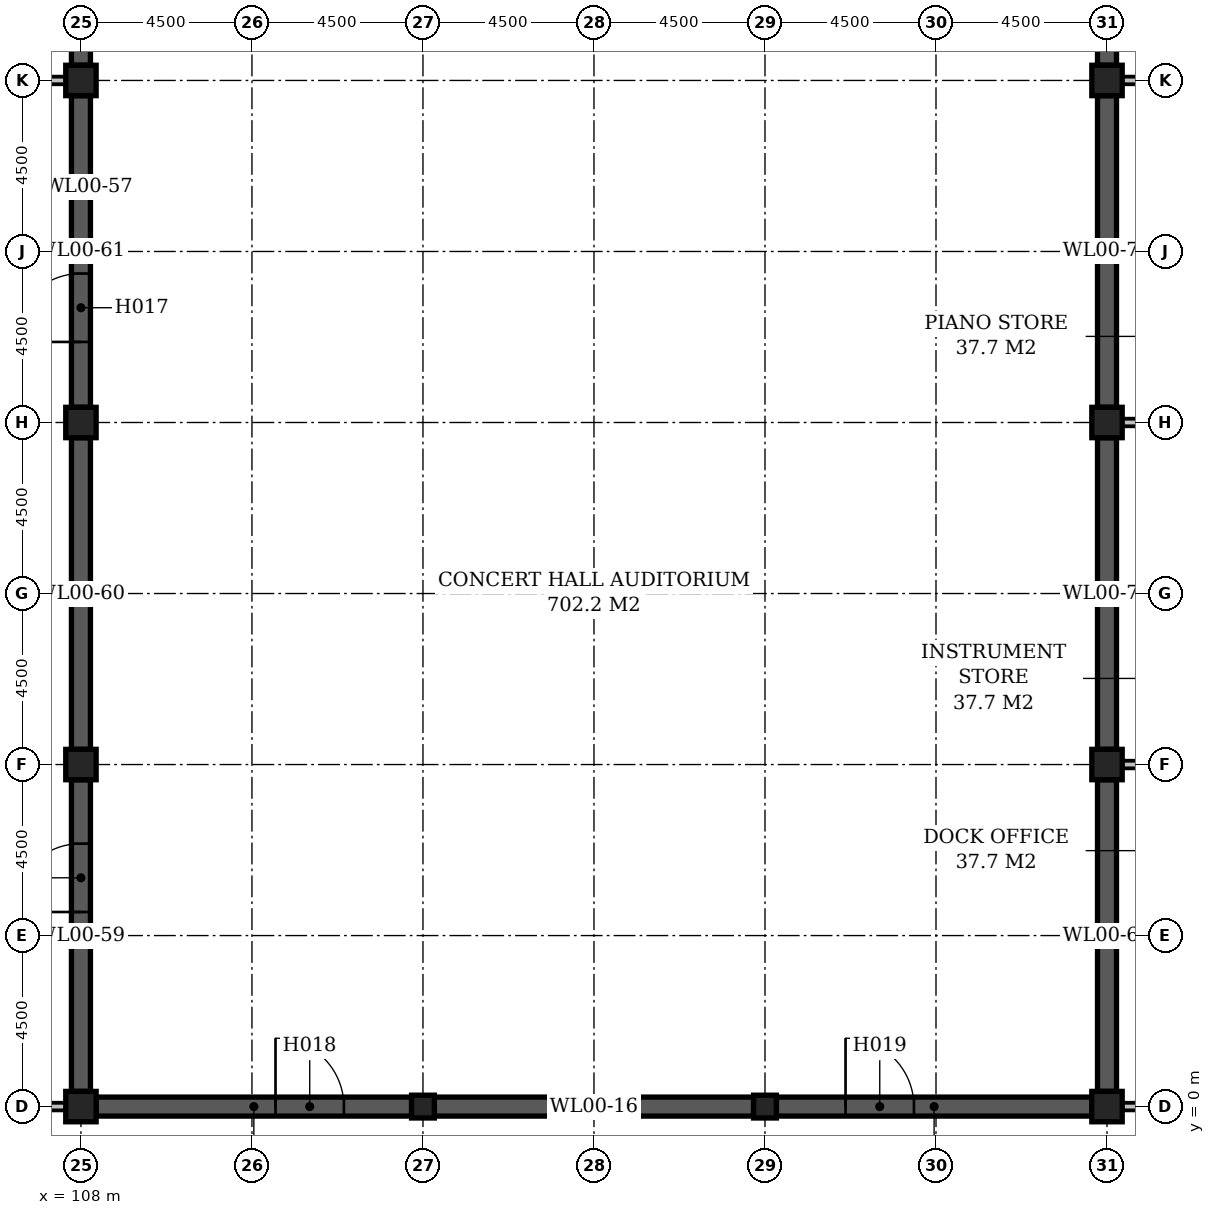
"""IFC4 building model, lengths in metres.
Left out: names, types, materials, properties, quantities, classifications, styles, units other than length and angle.
Written with IfcOpenShell. Run it as: python <this file> out.ifc"""

import sys

from ifc_helpers import new_model, si_unit, direction, frame, frame_2d, origin, origin_2d, place, context, subcontext, project, spatial, rectangle, extrude, element, fill, save


model = new_model("IFC4")
c1 = context("Model", 3, precision=1e-05, world=origin(), true_north=direction((0.0, 1.0)))
c2 = subcontext(c1, "Body", "Model", "MODEL_VIEW")
j1 = project(units=[si_unit("LENGTHUNIT", "METRE"), si_unit("PLANEANGLEUNIT", "RADIAN")], contexts=[c1])
p1 = place(None, origin())
s1 = spatial("IfcSite", under=j1, at=p1, CompositionType="ELEMENT")
p2 = place(p1, origin())
s2 = spatial("IfcBuilding", under=s1, at=p2, CompositionType="ELEMENT")
p3 = place(p2, origin())
s3 = spatial("IfcBuildingStorey", under=s2, at=p3, CompositionType="ELEMENT", Elevation=0.0)
for number, where, z_axis, x_axis in (
    (1, (108.0, 0.0, -0.3), (0.0, 0.0, 1.0), (1.0, 0.0, 0.0)),
    (2, (108.0, 9.0, -0.3), (0.0, 0.0, 1.0), (1.0, 0.0, 0.0)),
    (3, (108.0, 18.0, -0.3), (0.0, 0.0, 1.0), (1.0, 0.0, 0.0)),
    (4, (108.0, 27.0, -0.3), (0.0, 0.0, 1.0), (1.0, 0.0, 0.0)),
):
    element("IfcColumn", number, at=place(p3, frame(where, z_axis=z_axis, x_axis=x_axis)), inside=s3, PredefinedType="COLUMN", context=c2, shape_type="SweptSolid", body=[
        extrude(rectangle(XDim=0.8, YDim=0.8, at=origin_2d()), origin(), (0.0, 0.0, 1.0), 9.0),
    ])
for number, where, z_axis, x_axis in (
    (5, (117.0, 0.0, -0.3), (0.0, 0.0, 1.0), (1.0, 0.0, 0.0)),
    (6, (126.0, 0.0, -0.3), (0.0, 0.0, 1.0), (1.0, 0.0, 0.0)),
):
    element("IfcColumn", number, at=place(p3, frame(where, z_axis=z_axis, x_axis=x_axis)), inside=s3, PredefinedType="COLUMN", context=c2, shape_type="SweptSolid", body=[
        extrude(rectangle(XDim=0.6, YDim=0.6, at=origin_2d()), origin(), (0.0, 0.0, 1.0), 9.0),
    ])
for number, where, z_axis, x_axis in (
    (7, (135.0, 0.0, -0.3), (0.0, 0.0, 1.0), (1.0, 0.0, 0.0)),
    (8, (135.0, 9.0, -0.3), (0.0, 0.0, 1.0), (1.0, 0.0, 0.0)),
    (9, (135.0, 18.0, -0.3), (0.0, 0.0, 1.0), (1.0, 0.0, 0.0)),
    (10, (135.0, 27.0, -0.3), (0.0, 0.0, 1.0), (1.0, 0.0, 0.0)),
):
    element("IfcColumn", number, at=place(p3, frame(where, z_axis=z_axis, x_axis=x_axis)), inside=s3, PredefinedType="COLUMN", context=c2, shape_type="SweptSolid", body=[
        extrude(rectangle(XDim=0.8, YDim=0.8, at=origin_2d()), origin(), (0.0, 0.0, 1.0), 9.0),
    ])
p4 = place(p3, frame((99.3, 0.0, 0.0), z_axis=(0.0, 0.0, 1.0), x_axis=(1.0, 0.0, 0.0)))
e11 = element("IfcWall", 11, at=p4, inside=s3, PredefinedType="STANDARD", context=c2, shape_type="SweptSolid", body=[
    extrude(rectangle(XDim=8.3, YDim=0.2, at=frame_2d((4.15, 0.0))), origin(), (0.0, 0.0, 1.0), 8.7),
])
p5 = place(p4, frame((1.52, 0.0, 0.0)))
e12 = element("IfcOpeningElement", 12, at=p5, cuts=e11, PredefinedType="OPENING", context=c2, shape_type="SweptSolid", body=[
    extrude(rectangle(XDim=2.4, YDim=2.7, at=frame_2d((1.2, 1.35))), frame((0.0, 0.112, 0.0), z_axis=(0.0, -1.0, 0.0), x_axis=(1.0, 0.0, 0.0)), (0.0, 0.0, 1.0), 0.224),
])
p6 = place(p3, frame((108.4, 0.0, 0.0), z_axis=(0.0, 0.0, 1.0), x_axis=(1.0, 0.0, 0.0)))
e13 = element("IfcWall", 13, at=p6, inside=s3, PredefinedType="STANDARD", context=c2, shape_type="SweptSolid", body=[
    extrude(rectangle(XDim=8.3, YDim=0.5, at=frame_2d((4.15, 0.0))), origin(), (0.0, 0.0, 1.0), 9.0),
])
p7 = place(p6, frame((4.72, 0.0, 0.0)))
e14 = element("IfcOpeningElement", 14, at=p7, cuts=e13, PredefinedType="OPENING", context=c2, shape_type="SweptSolid", body=[
    extrude(rectangle(XDim=1.8, YDim=2.4, at=frame_2d((0.9, 1.2))), frame((0.0, 0.262, 0.0), z_axis=(0.0, -1.0, 0.0), x_axis=(1.0, 0.0, 0.0)), (0.0, 0.0, 1.0), 0.524),
])
p8 = place(p3, frame((117.3, 0.0, 0.0), z_axis=(0.0, 0.0, 1.0), x_axis=(1.0, 0.0, 0.0)))
e15 = element("IfcWall", 15, at=p8, inside=s3, PredefinedType="STANDARD", context=c2, shape_type="SweptSolid", body=[
    extrude(rectangle(XDim=8.4, YDim=0.5, at=frame_2d((4.2, 0.0))), origin(), (0.0, 0.0, 1.0), 9.0),
])
p9 = place(p3, frame((126.3, 0.0, 0.0), z_axis=(0.0, 0.0, 1.0), x_axis=(1.0, 0.0, 0.0)))
e16 = element("IfcWall", 16, at=p9, inside=s3, PredefinedType="STANDARD", context=c2, shape_type="SweptSolid", body=[
    extrude(rectangle(XDim=8.3, YDim=0.5, at=frame_2d((4.15, 0.0))), origin(), (0.0, 0.0, 1.0), 9.0),
])
p10 = place(p9, frame((1.82, 0.0, 0.0)))
e17 = element("IfcOpeningElement", 17, at=p10, cuts=e16, PredefinedType="OPENING", context=c2, shape_type="SweptSolid", body=[
    extrude(rectangle(XDim=1.8, YDim=2.4, at=frame_2d((0.9, 1.2))), frame((0.0, 0.262, 0.0), z_axis=(0.0, -1.0, 0.0), x_axis=(1.0, 0.0, 0.0)), (0.0, 0.0, 1.0), 0.524),
])
p11 = place(p3, frame((135.4, 0.0, 0.0), z_axis=(0.0, 0.0, 1.0), x_axis=(1.0, 0.0, 0.0)))
e18 = element("IfcWall", 18, at=p11, inside=s3, PredefinedType="STANDARD", context=c2, shape_type="SweptSolid", body=[
    extrude(rectangle(XDim=8.3, YDim=0.2, at=frame_2d((4.15, 0.0))), origin(), (0.0, 0.0, 1.0), 8.7),
])
for number, where, z_axis, x_axis in (
    (19, (135.4, 9.0, 0.0), (0.0, 0.0, 1.0), (1.0, 0.0, 0.0)),
    (20, (135.4, 18.0, 0.0), (0.0, 0.0, 1.0), (1.0, 0.0, 0.0)),
):
    element("IfcWall", number, at=place(p3, frame(where, z_axis=z_axis, x_axis=x_axis)), inside=s3, PredefinedType="STANDARD", context=c2, shape_type="SweptSolid", body=[
        extrude(rectangle(XDim=4.0, YDim=0.2, at=frame_2d((2.0, 0.0))), origin(), (0.0, 0.0, 1.0), 8.7),
    ])
p12 = place(p3, frame((99.3, 27.0, 0.0), z_axis=(0.0, 0.0, 1.0), x_axis=(1.0, 0.0, 0.0)))
e21 = element("IfcWall", 21, at=p12, inside=s3, PredefinedType="STANDARD", context=c2, shape_type="SweptSolid", body=[
    extrude(rectangle(XDim=8.3, YDim=0.2, at=frame_2d((4.15, 0.0))), origin(), (0.0, 0.0, 1.0), 8.7),
])
p13 = place(p12, frame((0.12, 0.0, 0.0)))
e22 = element("IfcOpeningElement", 22, at=p13, cuts=e21, PredefinedType="OPENING", context=c2, shape_type="SweptSolid", body=[
    extrude(rectangle(XDim=1.8, YDim=2.4, at=frame_2d((0.9, 1.2))), frame((0.0, 0.112, 0.0), z_axis=(0.0, -1.0, 0.0), x_axis=(1.0, 0.0, 0.0)), (0.0, 0.0, 1.0), 0.224),
])
p14 = place(p12, frame((5.97, 0.0, 0.0)))
e23 = element("IfcOpeningElement", 23, at=p14, cuts=e21, PredefinedType="OPENING", context=c2, shape_type="SweptSolid", body=[
    extrude(rectangle(XDim=1.0, YDim=2.1, at=frame_2d((0.5, 1.05))), frame((0.0, 0.112, 0.0), z_axis=(0.0, -1.0, 0.0), x_axis=(1.0, 0.0, 0.0)), (0.0, 0.0, 1.0), 0.224),
])
p15 = place(p3, frame((135.4, 27.0, 0.0), z_axis=(0.0, 0.0, 1.0), x_axis=(1.0, 0.0, 0.0)))
e24 = element("IfcWall", 24, at=p15, inside=s3, PredefinedType="STANDARD", context=c2, shape_type="SweptSolid", body=[
    extrude(rectangle(XDim=4.0, YDim=0.2, at=frame_2d((2.0, 0.0))), origin(), (0.0, 0.0, 1.0), 8.7),
])
p16 = place(p3, frame((108.0, 0.4, 0.0), z_axis=(0.0, 0.0, 1.0), x_axis=(0.0, 1.0, 0.0)))
e25 = element("IfcWall", 25, at=p16, inside=s3, PredefinedType="STANDARD", context=c2, shape_type="SweptSolid", body=[
    extrude(rectangle(XDim=8.2, YDim=0.5, at=frame_2d((4.1, 0.0))), origin(), (0.0, 0.0, 1.0), 9.0),
])
p17 = place(p16, frame((4.72, 0.0, 0.0)))
e26 = element("IfcOpeningElement", 26, at=p17, cuts=e25, PredefinedType="OPENING", context=c2, shape_type="SweptSolid", body=[
    extrude(rectangle(XDim=1.8, YDim=2.4, at=frame_2d((0.9, 1.2))), frame((0.0, 0.262, 0.0), z_axis=(0.0, -1.0, 0.0), x_axis=(1.0, 0.0, 0.0)), (0.0, 0.0, 1.0), 0.524),
])
p18 = place(p3, frame((108.0, 9.4, 0.0), z_axis=(0.0, 0.0, 1.0), x_axis=(0.0, 1.0, 0.0)))
e27 = element("IfcWall", 27, at=p18, inside=s3, PredefinedType="STANDARD", context=c2, shape_type="SweptSolid", body=[
    extrude(rectangle(XDim=8.2, YDim=0.5, at=frame_2d((4.1, 0.0))), origin(), (0.0, 0.0, 1.0), 9.0),
])
p19 = place(p3, frame((108.0, 18.4, 0.0), z_axis=(0.0, 0.0, 1.0), x_axis=(0.0, 1.0, 0.0)))
e28 = element("IfcWall", 28, at=p19, inside=s3, PredefinedType="STANDARD", context=c2, shape_type="SweptSolid", body=[
    extrude(rectangle(XDim=8.2, YDim=0.5, at=frame_2d((4.1, 0.0))), origin(), (0.0, 0.0, 1.0), 9.0),
])
p20 = place(p19, frame((1.72, 0.0, 0.0)))
e29 = element("IfcOpeningElement", 29, at=p20, cuts=e28, PredefinedType="OPENING", context=c2, shape_type="SweptSolid", body=[
    extrude(rectangle(XDim=1.8, YDim=2.4, at=frame_2d((0.9, 1.2))), frame((0.0, 0.262, 0.0), z_axis=(0.0, -1.0, 0.0), x_axis=(1.0, 0.0, 0.0)), (0.0, 0.0, 1.0), 0.524),
])
p21 = place(p3, frame((108.0, 27.4, 0.0), z_axis=(0.0, 0.0, 1.0), x_axis=(0.0, 1.0, 0.0)))
e30 = element("IfcWall", 30, at=p21, inside=s3, PredefinedType="STANDARD", context=c2, shape_type="SweptSolid", body=[
    extrude(rectangle(XDim=8.3, YDim=0.5, at=frame_2d((4.15, 0.0))), origin(), (0.0, 0.0, 1.0), 9.0),
])
for number, where, z_axis, x_axis in (
    (31, (135.0, 0.4, 0.0), (0.0, 0.0, 1.0), (0.0, 1.0, 0.0)),
    (32, (135.0, 9.4, 0.0), (0.0, 0.0, 1.0), (0.0, 1.0, 0.0)),
    (33, (135.0, 18.4, 0.0), (0.0, 0.0, 1.0), (0.0, 1.0, 0.0)),
):
    element("IfcWall", number, at=place(p3, frame(where, z_axis=z_axis, x_axis=x_axis)), inside=s3, PredefinedType="STANDARD", context=c2, shape_type="SweptSolid", body=[
        extrude(rectangle(XDim=8.2, YDim=0.5, at=frame_2d((4.1, 0.0))), origin(), (0.0, 0.0, 1.0), 9.0),
    ])
p22 = place(p3, frame((135.0, 27.4, 0.0), z_axis=(0.0, 0.0, 1.0), x_axis=(0.0, 1.0, 0.0)))
e34 = element("IfcWall", 34, at=p22, inside=s3, PredefinedType="STANDARD", context=c2, shape_type="SweptSolid", body=[
    extrude(rectangle(XDim=8.3, YDim=0.5, at=frame_2d((4.15, 0.0))), origin(), (0.0, 0.0, 1.0), 9.0),
])
p23 = place(p22, frame((3.52, 0.0, 0.0)))
e35 = element("IfcOpeningElement", 35, at=p23, cuts=e34, PredefinedType="OPENING", context=c2, shape_type="SweptSolid", body=[
    extrude(rectangle(XDim=1.2, YDim=2.4, at=frame_2d((0.6, 1.2))), frame((0.0, 0.262, 0.0), z_axis=(0.0, -1.0, 0.0), x_axis=(1.0, 0.0, 0.0)), (0.0, 0.0, 1.0), 0.524),
])
p24 = place(p17, origin())
e36 = element("IfcDoor", 36, at=p24, inside=s3, OperationType="DOUBLE_DOOR_SINGLE_SWING", PredefinedType="DOOR", context=c2, shape_type="SweptSolid", body=[
    extrude(rectangle(XDim=1.8, YDim=2.4, at=frame_2d((0.9, 1.2))), frame((0.0, 0.025, 0.0), z_axis=(0.0, -1.0, 0.0), x_axis=(1.0, 0.0, 0.0)), (0.0, 0.0, 1.0), 0.05),
])
fill(e26, e36)
p25 = place(p20, origin())
e37 = element("IfcDoor", 37, at=p25, inside=s3, OperationType="DOUBLE_DOOR_SINGLE_SWING", PredefinedType="DOOR", context=c2, shape_type="SweptSolid", body=[
    extrude(rectangle(XDim=1.8, YDim=2.4, at=frame_2d((0.9, 1.2))), frame((0.0, 0.025, 0.0), z_axis=(0.0, -1.0, 0.0), x_axis=(1.0, 0.0, 0.0)), (0.0, 0.0, 1.0), 0.05),
])
fill(e29, e37)
p26 = place(p7, origin())
e38 = element("IfcDoor", 38, at=p26, inside=s3, OperationType="DOUBLE_DOOR_SINGLE_SWING", PredefinedType="DOOR", context=c2, shape_type="SweptSolid", body=[
    extrude(rectangle(XDim=1.8, YDim=2.4, at=frame_2d((0.9, 1.2))), frame((0.0, 0.025, 0.0), z_axis=(0.0, -1.0, 0.0), x_axis=(1.0, 0.0, 0.0)), (0.0, 0.0, 1.0), 0.05),
])
fill(e14, e38)
p27 = place(p10, origin())
e39 = element("IfcDoor", 39, at=p27, inside=s3, OperationType="DOUBLE_DOOR_SINGLE_SWING", PredefinedType="DOOR", context=c2, shape_type="SweptSolid", body=[
    extrude(rectangle(XDim=1.8, YDim=2.4, at=frame_2d((0.9, 1.2))), frame((0.0, 0.025, 0.0), z_axis=(0.0, -1.0, 0.0), x_axis=(1.0, 0.0, 0.0)), (0.0, 0.0, 1.0), 0.05),
])
fill(e17, e39)
save(model, sys.argv[1])
